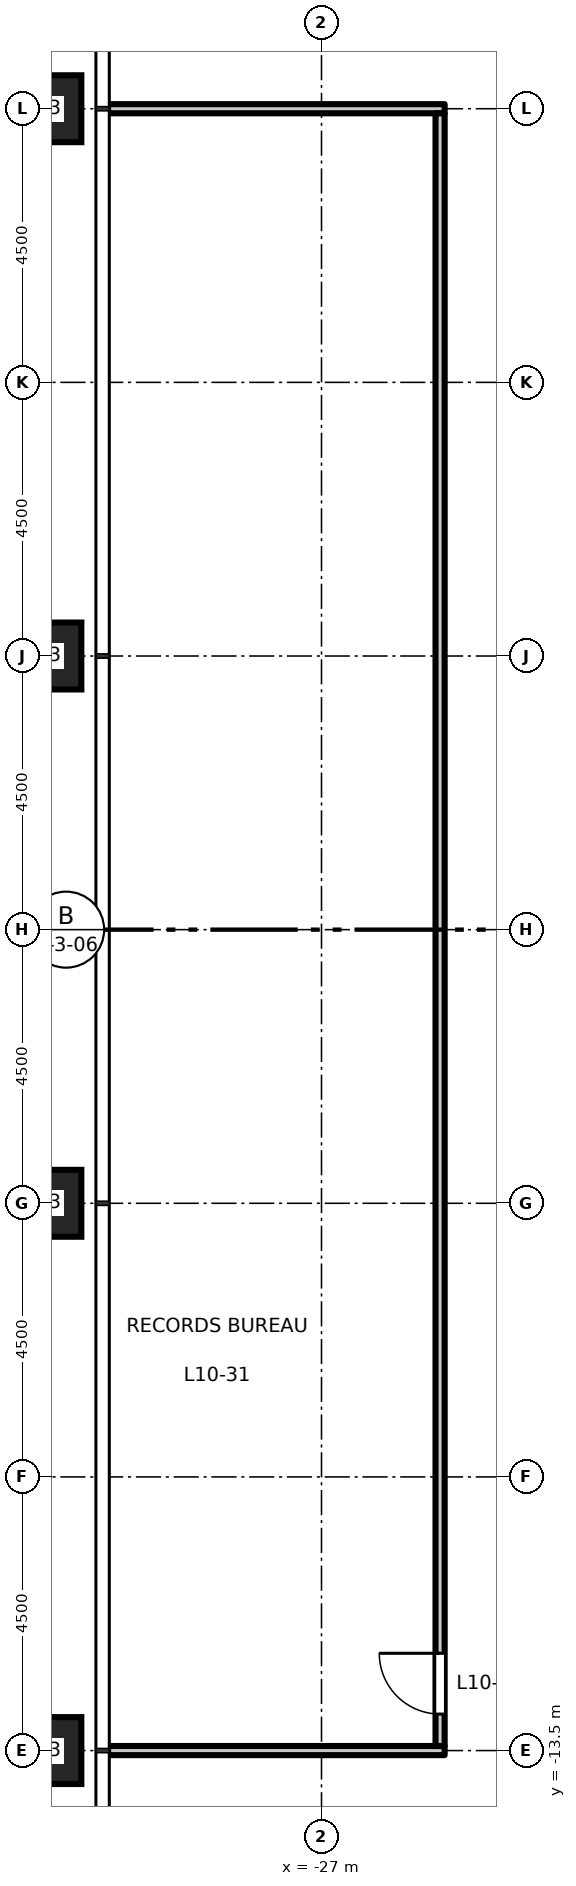
"""IFC4 building model, lengths in metres.
Left out: names, types, materials, properties, quantities, classifications, styles, units other than length and angle.
Written with IfcOpenShell. Run it as: python <this file> out.ifc"""

import sys

from ifc_helpers import new_model, si_unit, direction, frame, frame_2d, origin, origin_2d, place, context, subcontext, project, spatial, rectangle, hollow_rectangle, extrude, element, fill, save


model = new_model("IFC4")
c1 = context("Model", 3, precision=1e-05, world=origin(), true_north=direction((0.0, 1.0)))
c2 = subcontext(c1, "Body", "Model", "MODEL_VIEW")
j1 = project(units=[si_unit("LENGTHUNIT", "METRE"), si_unit("PLANEANGLEUNIT", "RADIAN")], contexts=[c1])
p1 = place(None, origin())
s1 = spatial("IfcSite", under=j1, at=p1, CompositionType="ELEMENT")
p2 = place(p1, origin())
s2 = spatial("IfcBuilding", under=s1, at=p2, CompositionType="ELEMENT")
p3 = place(p2, frame((0.0, 0.0, 49.2)))
s3 = spatial("IfcBuildingStorey", under=s2, at=p3, CompositionType="ELEMENT", Elevation=49.2)
for number, where, z_axis, x_axis in (
    (1, (-31.5, 13.5, 0.0), (0.0, 0.0, 1.0), (1.0, 0.0, 0.0)),
    (2, (-31.5, 4.5, 0.0), (0.0, 0.0, 1.0), (1.0, 0.0, 0.0)),
    (3, (-31.5, -4.5, 0.0), (0.0, 0.0, 1.0), (1.0, 0.0, 0.0)),
    (4, (-31.5, -13.5, 0.0), (0.0, 0.0, 1.0), (1.0, 0.0, 0.0)),
):
    element("IfcColumn", number, at=place(p3, frame(where, z_axis=z_axis, x_axis=x_axis)), inside=s3, PredefinedType="COLUMN", context=c2, shape_type="SweptSolid", body=[
        extrude(hollow_rectangle(XDim=1.1, YDim=1.1, WallThickness=0.07, at=origin_2d()), origin(), (0.0, 0.0, 1.0), 4.5),
    ])
for number, where, z_axis, x_axis in (
    (5, (-30.51, -13.5, 0.0), (0.0, 0.0, 1.0), (1.0, 0.0, 0.0)),
    (6, (-30.51, 13.5, 0.0), (0.0, 0.0, 1.0), (1.0, 0.0, 0.0)),
):
    element("IfcWall", number, at=place(p3, frame(where, z_axis=z_axis, x_axis=x_axis)), inside=s3, PredefinedType="PARTITIONING", context=c2, shape_type="SweptSolid", body=[
        extrude(rectangle(XDim=5.535, YDim=0.15, at=frame_2d((2.768, 0.0))), origin(), (0.0, 0.0, 1.0), 3.35),
    ])
p4 = place(p3, frame((-25.05, -13.425, 0.0), z_axis=(0.0, 0.0, 1.0), x_axis=(0.0, 1.0, 0.0)))
e7 = element("IfcWall", 7, at=p4, inside=s3, PredefinedType="PARTITIONING", context=c2, shape_type="SweptSolid", body=[
    extrude(rectangle(XDim=26.85, YDim=0.15, at=frame_2d((13.425, 0.0))), origin(), (0.0, 0.0, 1.0), 4.35),
])
p5 = place(p4, frame((0.525, 0.0, 0.0)))
e8 = element("IfcOpeningElement", 8, at=p5, cuts=e7, PredefinedType="OPENING", context=c2, shape_type="SweptSolid", body=[
    extrude(rectangle(XDim=1.0, YDim=2.1, at=frame_2d((0.5, 1.05))), frame((0.0, 0.085, 0.0), z_axis=(0.0, -1.0, 0.0), x_axis=(1.0, 0.0, 0.0)), (0.0, 0.0, 1.0), 0.17),
])
p6 = place(p5, origin())
e9 = element("IfcDoor", 9, at=p6, inside=s3, OperationType="SINGLE_SWING_RIGHT", PredefinedType="DOOR", context=c2, shape_type="SweptSolid", body=[
    extrude(rectangle(XDim=1.0, YDim=2.1, at=frame_2d((0.5, 1.05))), frame((0.0, 0.025, 0.0), z_axis=(0.0, -1.0, 0.0), x_axis=(1.0, 0.0, 0.0)), (0.0, 0.0, 1.0), 0.05),
])
fill(e8, e9)
save(model, sys.argv[1])
